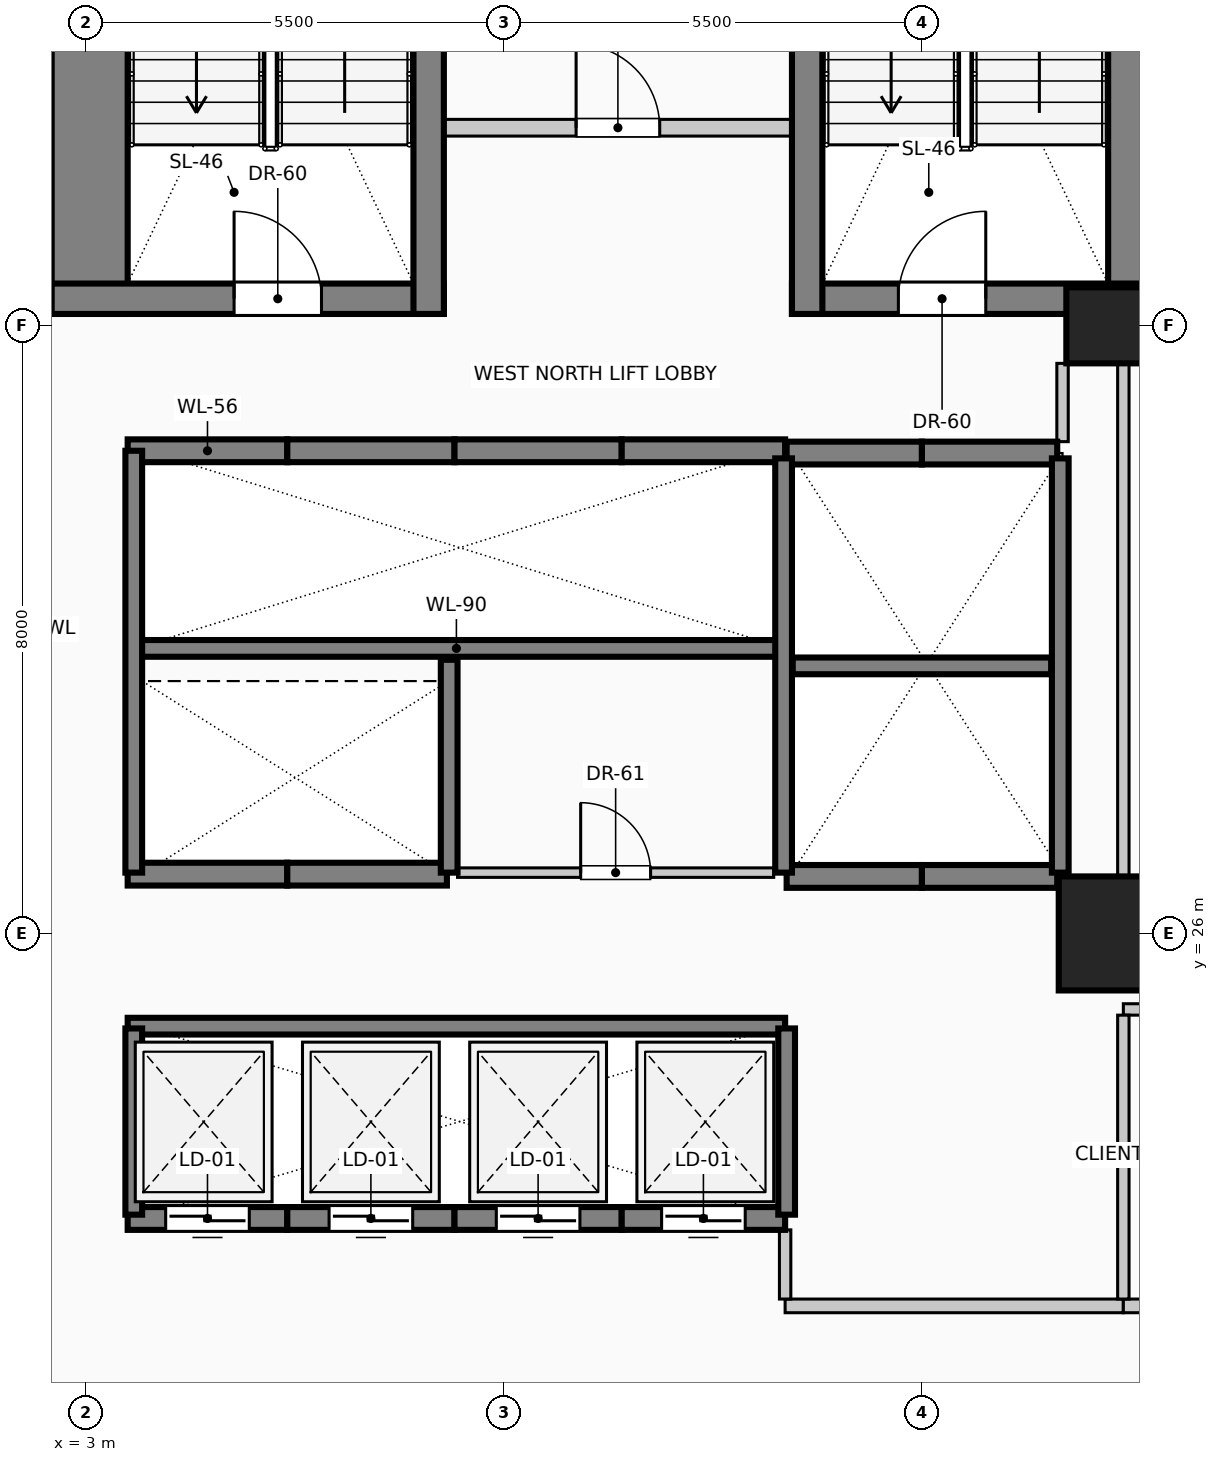
"""IFC4 building model, lengths in metres.
Left out: names, types, materials, properties, quantities, classifications, styles, units other than length and angle.
Written with IfcOpenShell. Run it as: python <this file> out.ifc"""

import sys

from ifc_helpers import new_model, si_unit, direction, frame, frame_2d, origin, origin_2d, place, context, subcontext, project, spatial, rectangle, circle, extrude, element, fill, save


model = new_model("IFC4")
c1 = context("Model", 3, precision=1e-05, world=origin(), true_north=direction((0.0, 1.0)))
c2 = subcontext(c1, "Body", "Model", "MODEL_VIEW")
j1 = project(units=[si_unit("LENGTHUNIT", "METRE"), si_unit("PLANEANGLEUNIT", "RADIAN")], contexts=[c1])
p1 = place(None, origin())
s1 = spatial("IfcSite", under=j1, at=p1, CompositionType="ELEMENT")
p2 = place(p1, origin())
s2 = spatial("IfcBuilding", under=s1, at=p2, CompositionType="ELEMENT")
p3 = place(p2, frame((0.0, 0.0, 58.6)))
s3 = spatial("IfcBuildingStorey", under=s2, at=p3, CompositionType="ELEMENT", Elevation=58.6)
for number, where, z_axis, x_axis in (
    (1, (3.05, 34.15, 0.0), (0.0, 0.0, 1.0), (0.0, 1.0, 0.0)),
    (2, (16.95, 34.15, 0.0), (0.0, 0.0, 1.0), (0.0, 1.0, 0.0)),
):
    element("IfcWall", number, at=place(p3, frame(where, z_axis=z_axis, x_axis=x_axis)), inside=s3, PredefinedType="SHEAR", context=c2, shape_type="SweptSolid", body=[
        extrude(rectangle(XDim=9.28, YDim=1.0, at=frame_2d((4.64, 0.0))), origin(), (0.0, 0.0, 1.0), 4.0),
    ])
p4 = place(p3, frame((2.55, 34.35, 0.0), z_axis=(0.0, 0.0, 1.0), x_axis=(1.0, 0.0, 0.0)))
e3 = element("IfcWall", 3, at=p4, inside=s3, PredefinedType="SHEAR", context=c2, shape_type="SweptSolid", body=[
    extrude(rectangle(XDim=5.16, YDim=0.4, at=frame_2d((2.58, 0.0))), origin(), (0.0, 0.0, 1.0), 4.0),
])
p5 = place(p4, frame((2.4, 0.0, 0.0)))
e4 = element("IfcOpeningElement", 4, at=p5, cuts=e3, PredefinedType="OPENING", context=c2, shape_type="SweptSolid", body=[
    extrude(rectangle(XDim=1.15, YDim=2.2, at=frame_2d((0.575, 1.1))), frame((0.0, 0.21, 0.0), z_axis=(0.0, -1.0, 0.0), x_axis=(1.0, 0.0, 0.0)), (0.0, 0.0, 1.0), 0.42),
])
p6 = place(p3, frame((12.29, 34.35, 0.0), z_axis=(0.0, 0.0, 1.0), x_axis=(1.0, 0.0, 0.0)))
e5 = element("IfcWall", 5, at=p6, inside=s3, PredefinedType="SHEAR", context=c2, shape_type="SweptSolid", body=[
    extrude(rectangle(XDim=5.16, YDim=0.4, at=frame_2d((2.58, 0.0))), origin(), (0.0, 0.0, 1.0), 4.0),
])
p7 = place(p6, frame((1.4, 0.0, 0.0)))
e6 = element("IfcOpeningElement", 6, at=p7, cuts=e5, PredefinedType="OPENING", context=c2, shape_type="SweptSolid", body=[
    extrude(rectangle(XDim=1.15, YDim=2.2, at=frame_2d((0.575, 1.1))), frame((0.0, 0.21, 0.0), z_axis=(0.0, -1.0, 0.0), x_axis=(1.0, 0.0, 0.0)), (0.0, 0.0, 1.0), 0.42),
])
for number, where, z_axis, x_axis in (
    (7, (7.51, 34.15, 0.0), (0.0, 0.0, 1.0), (0.0, 1.0, 0.0)),
    (8, (12.49, 34.15, 0.0), (0.0, 0.0, 1.0), (0.0, 1.0, 0.0)),
):
    element("IfcWall", number, at=place(p3, frame(where, z_axis=z_axis, x_axis=x_axis)), inside=s3, PredefinedType="SHEAR", context=c2, shape_type="SweptSolid", body=[
        extrude(rectangle(XDim=9.28, YDim=0.4, at=frame_2d((4.64, 0.0))), origin(), (0.0, 0.0, 1.0), 4.0),
    ])
p8 = place(p3, frame((16.4, 26.0, 0.0), z_axis=(0.0, 0.0, 1.0), x_axis=(1.0, 0.0, 0.0)))
e9 = element("IfcColumn", 9, at=p8, inside=s3, PredefinedType="COLUMN", context=c2, shape_type="SweptSolid", body=[
    extrude(rectangle(XDim=1.2, YDim=1.5, at=origin_2d()), origin(), (0.0, 0.0, 1.0), 4.0),
])
p9 = place(p3, frame((16.4, 34.0, 0.0), z_axis=(0.0, 0.0, 1.0), x_axis=(1.0, 0.0, 0.0)))
e10 = element("IfcColumn", 10, at=p9, inside=s3, PredefinedType="COLUMN", context=c2, shape_type="SweptSolid", body=[
    extrude(circle(Radius=0.5, at=origin_2d()), origin(), (0.0, 0.0, 1.0), 4.0),
])
p10 = place(p3, frame((5.65, 22.25, 0.0), z_axis=(0.0, 0.0, 1.0), x_axis=(-1.0, 0.0, 0.0)))
e11 = element("IfcWall", 11, at=p10, inside=s3, PredefinedType="SOLIDWALL", context=c2, shape_type="SweptSolid", body=[
    extrude(rectangle(XDim=2.1, YDim=0.3, at=frame_2d((1.05, 0.0))), origin(), (0.0, 0.0, 1.0), 4.0),
])
p11 = place(p10, frame((0.5, 0.0, 0.0)))
e12 = element("IfcOpeningElement", 12, at=p11, cuts=e11, PredefinedType="OPENING", context=c2, shape_type="SweptSolid", body=[
    extrude(rectangle(XDim=1.1, YDim=2.2, at=frame_2d((0.55, 1.1))), frame((0.0, 0.16, 0.0), z_axis=(0.0, -1.0, 0.0), x_axis=(1.0, 0.0, 0.0)), (0.0, 0.0, 1.0), 0.32),
])
p12 = place(p3, frame((7.85, 22.25, 0.0), z_axis=(0.0, 0.0, 1.0), x_axis=(-1.0, 0.0, 0.0)))
e13 = element("IfcWall", 13, at=p12, inside=s3, PredefinedType="SOLIDWALL", context=c2, shape_type="SweptSolid", body=[
    extrude(rectangle(XDim=2.2, YDim=0.3, at=frame_2d((1.1, 0.0))), origin(), (0.0, 0.0, 1.0), 4.0),
])
p13 = place(p12, frame((0.55, 0.0, 0.0)))
e14 = element("IfcOpeningElement", 14, at=p13, cuts=e13, PredefinedType="OPENING", context=c2, shape_type="SweptSolid", body=[
    extrude(rectangle(XDim=1.1, YDim=2.2, at=frame_2d((0.55, 1.1))), frame((0.0, 0.16, 0.0), z_axis=(0.0, -1.0, 0.0), x_axis=(1.0, 0.0, 0.0)), (0.0, 0.0, 1.0), 0.32),
])
p14 = place(p3, frame((10.05, 22.25, 0.0), z_axis=(0.0, 0.0, 1.0), x_axis=(-1.0, 0.0, 0.0)))
e15 = element("IfcWall", 15, at=p14, inside=s3, PredefinedType="SOLIDWALL", context=c2, shape_type="SweptSolid", body=[
    extrude(rectangle(XDim=2.2, YDim=0.3, at=frame_2d((1.1, 0.0))), origin(), (0.0, 0.0, 1.0), 4.0),
])
p15 = place(p14, frame((0.55, 0.0, 0.0)))
e16 = element("IfcOpeningElement", 16, at=p15, cuts=e15, PredefinedType="OPENING", context=c2, shape_type="SweptSolid", body=[
    extrude(rectangle(XDim=1.1, YDim=2.2, at=frame_2d((0.55, 1.1))), frame((0.0, 0.16, 0.0), z_axis=(0.0, -1.0, 0.0), x_axis=(1.0, 0.0, 0.0)), (0.0, 0.0, 1.0), 0.32),
])
p16 = place(p3, frame((12.2, 22.25, 0.0), z_axis=(0.0, 0.0, 1.0), x_axis=(-1.0, 0.0, 0.0)))
e17 = element("IfcWall", 17, at=p16, inside=s3, PredefinedType="SOLIDWALL", context=c2, shape_type="SweptSolid", body=[
    extrude(rectangle(XDim=2.15, YDim=0.3, at=frame_2d((1.075, 0.0))), origin(), (0.0, 0.0, 1.0), 4.0),
])
p17 = place(p16, frame((0.525, 0.0, 0.0)))
e18 = element("IfcOpeningElement", 18, at=p17, cuts=e17, PredefinedType="OPENING", context=c2, shape_type="SweptSolid", body=[
    extrude(rectangle(XDim=1.1, YDim=2.2, at=frame_2d((0.55, 1.1))), frame((0.0, 0.16, 0.0), z_axis=(0.0, -1.0, 0.0), x_axis=(1.0, 0.0, 0.0)), (0.0, 0.0, 1.0), 0.32),
])
for number, where, z_axis, x_axis in (
    (19, (14.0, 26.75, 0.0), (0.0, 0.0, 1.0), (-1.0, 0.0, 0.0)),
    (20, (15.78, 26.75, 0.0), (0.0, 0.0, 1.0), (-1.0, 0.0, 0.0)),
    (21, (12.22, 32.32, 0.0), (0.0, 0.0, 1.0), (1.0, 0.0, 0.0)),
    (22, (14.0, 32.32, 0.0), (0.0, 0.0, 1.0), (1.0, 0.0, 0.0)),
):
    element("IfcWall", number, at=place(p3, frame(where, z_axis=z_axis, x_axis=x_axis)), inside=s3, PredefinedType="SOLIDWALL", context=c2, shape_type="SweptSolid", body=[
        extrude(rectangle(XDim=1.78, YDim=0.3, at=frame_2d((0.89, 0.0))), origin(), (0.0, 0.0, 1.0), 4.0),
    ])
p18 = place(p3, frame((3.55, 32.35, 0.0), z_axis=(0.0, 0.0, 1.0), x_axis=(1.0, 0.0, 0.0)))
e23 = element("IfcWall", 23, at=p18, inside=s3, PredefinedType="SOLIDWALL", context=c2, shape_type="SweptSolid", body=[
    extrude(rectangle(XDim=2.1, YDim=0.3, at=frame_2d((1.05, 0.0))), origin(), (0.0, 0.0, 1.0), 4.0),
])
p19 = place(p3, frame((5.65, 32.35, 0.0), z_axis=(0.0, 0.0, 1.0), x_axis=(1.0, 0.0, 0.0)))
e24 = element("IfcWall", 24, at=p19, inside=s3, PredefinedType="SOLIDWALL", context=c2, shape_type="SweptSolid", body=[
    extrude(rectangle(XDim=2.2, YDim=0.3, at=frame_2d((1.1, 0.0))), origin(), (0.0, 0.0, 1.0), 4.0),
])
p20 = place(p3, frame((7.85, 32.35, 0.0), z_axis=(0.0, 0.0, 1.0), x_axis=(1.0, 0.0, 0.0)))
e25 = element("IfcWall", 25, at=p20, inside=s3, PredefinedType="SOLIDWALL", context=c2, shape_type="SweptSolid", body=[
    extrude(rectangle(XDim=2.2, YDim=0.3, at=frame_2d((1.1, 0.0))), origin(), (0.0, 0.0, 1.0), 4.0),
])
p21 = place(p3, frame((10.05, 32.35, 0.0), z_axis=(0.0, 0.0, 1.0), x_axis=(1.0, 0.0, 0.0)))
e26 = element("IfcWall", 26, at=p21, inside=s3, PredefinedType="SOLIDWALL", context=c2, shape_type="SweptSolid", body=[
    extrude(rectangle(XDim=2.15, YDim=0.3, at=frame_2d((1.075, 0.0))), origin(), (0.0, 0.0, 1.0), 4.0),
])
p22 = place(p3, frame((5.65, 26.78, 0.0), z_axis=(0.0, 0.0, 1.0), x_axis=(-1.0, 0.0, 0.0)))
e27 = element("IfcWall", 27, at=p22, inside=s3, PredefinedType="SOLIDWALL", context=c2, shape_type="SweptSolid", body=[
    extrude(rectangle(XDim=2.1, YDim=0.3, at=frame_2d((1.05, 0.0))), origin(), (0.0, 0.0, 1.0), 4.0),
])
p23 = place(p3, frame((7.75, 26.78, 0.0), z_axis=(0.0, 0.0, 1.0), x_axis=(-1.0, 0.0, 0.0)))
e28 = element("IfcWall", 28, at=p23, inside=s3, PredefinedType="SOLIDWALL", context=c2, shape_type="SweptSolid", body=[
    extrude(rectangle(XDim=2.1, YDim=0.3, at=frame_2d((1.05, 0.0))), origin(), (0.0, 0.0, 1.0), 4.0),
])
p24 = place(p3, frame((3.55, 29.75, 0.0), z_axis=(0.0, 0.0, 1.0), x_axis=(1.0, 0.0, 0.0)))
e29 = element("IfcWall", 29, at=p24, inside=s3, PredefinedType="SOLIDWALL", context=c2, shape_type="SweptSolid", body=[
    extrude(rectangle(XDim=8.65, YDim=0.22, at=frame_2d((4.325, 0.0))), origin(), (0.0, 0.0, 1.0), 4.0),
])
p25 = place(p3, frame((3.63, 26.8, 0.0), z_axis=(0.0, 0.0, 1.0), x_axis=(0.0, 1.0, 0.0)))
e30 = element("IfcWall", 30, at=p25, inside=s3, PredefinedType="SOLIDWALL", context=c2, shape_type="SweptSolid", body=[
    extrude(rectangle(XDim=5.55, YDim=0.22, at=frame_2d((2.775, 0.0))), origin(), (0.0, 0.0, 1.0), 4.0),
])
p26 = place(p3, frame((7.78, 26.8, 0.0), z_axis=(0.0, 0.0, 1.0), x_axis=(0.0, 1.0, 0.0)))
e31 = element("IfcWall", 31, at=p26, inside=s3, PredefinedType="SOLIDWALL", context=c2, shape_type="SweptSolid", body=[
    extrude(rectangle(XDim=2.8, YDim=0.22, at=frame_2d((1.4, 0.0))), origin(), (0.0, 0.0, 1.0), 4.0),
])
for number, where, z_axis, x_axis in (
    (32, (12.18, 26.8, 0.0), (0.0, 0.0, 1.0), (0.0, 1.0, 0.0)),
    (33, (15.82, 26.8, 0.0), (0.0, 0.0, 1.0), (0.0, 1.0, 0.0)),
):
    element("IfcWall", number, at=place(p3, frame(where, z_axis=z_axis, x_axis=x_axis)), inside=s3, PredefinedType="SOLIDWALL", context=c2, shape_type="SweptSolid", body=[
        extrude(rectangle(XDim=5.45, YDim=0.22, at=frame_2d((2.725, 0.0))), origin(), (0.0, 0.0, 1.0), 4.0),
    ])
p27 = place(p3, frame((12.3, 29.52, 0.0), z_axis=(0.0, 0.0, 1.0), x_axis=(1.0, 0.0, 0.0)))
e34 = element("IfcWall", 34, at=p27, inside=s3, PredefinedType="SOLIDWALL", context=c2, shape_type="SweptSolid", body=[
    extrude(rectangle(XDim=3.4, YDim=0.22, at=frame_2d((1.7, 0.0))), origin(), (0.0, 0.0, 1.0), 4.0),
])
p28 = place(p3, frame((3.55, 24.78, 0.0), z_axis=(0.0, 0.0, 1.0), x_axis=(1.0, 0.0, 0.0)))
e35 = element("IfcWall", 35, at=p28, inside=s3, PredefinedType="SOLIDWALL", context=c2, shape_type="SweptSolid", body=[
    extrude(rectangle(XDim=8.65, YDim=0.22, at=frame_2d((4.325, 0.0))), origin(), (0.0, 0.0, 1.0), 4.0),
])
for number, where, z_axis, x_axis in (
    (36, (3.63, 22.3, 0.0), (0.0, 0.0, 1.0), (0.0, 1.0, 0.0)),
    (37, (12.22, 22.3, 0.0), (0.0, 0.0, 1.0), (0.0, 1.0, 0.0)),
):
    element("IfcWall", number, at=place(p3, frame(where, z_axis=z_axis, x_axis=x_axis)), inside=s3, PredefinedType="SOLIDWALL", context=c2, shape_type="SweptSolid", body=[
        extrude(rectangle(XDim=2.45, YDim=0.22, at=frame_2d((1.225, 0.0))), origin(), (0.0, 0.0, 1.0), 4.0),
    ])
p29 = place(p3, frame((7.51, 36.6, 0.0), z_axis=(0.0, 0.0, 1.0), x_axis=(1.0, 0.0, 0.0)))
e38 = element("IfcWall", 38, at=p29, inside=s3, PredefinedType="PARTITIONING", context=c2, shape_type="SweptSolid", body=[
    extrude(rectangle(XDim=4.98, YDim=0.22, at=frame_2d((2.49, 0.0))), origin(), (0.0, 0.0, 1.0), 3.7),
])
p30 = place(p29, frame((1.94, 0.0, 0.0)))
e39 = element("IfcOpeningElement", 39, at=p30, cuts=e38, PredefinedType="OPENING", context=c2, shape_type="SweptSolid", body=[
    extrude(rectangle(XDim=1.1, YDim=2.2, at=frame_2d((0.55, 1.1))), frame((0.0, 0.12, 0.0), z_axis=(0.0, -1.0, 0.0), x_axis=(1.0, 0.0, 0.0)), (0.0, 0.0, 1.0), 0.24),
])
p31 = place(p3, frame((12.2, 21.1, 0.0), z_axis=(0.0, 0.0, 1.0), x_axis=(1.0, 0.0, 0.0)))
e40 = element("IfcWall", 40, at=p31, inside=s3, PredefinedType="PARTITIONING", context=c2, shape_type="SweptSolid", body=[
    extrude(rectangle(XDim=4.45, YDim=0.18, at=frame_2d((2.225, 0.0))), origin(), (0.0, 0.0, 1.0), 3.7),
])
p32 = place(p3, frame((16.65, 21.1, 0.0), z_axis=(0.0, 0.0, 1.0), x_axis=(1.0, 0.0, 0.0)))
e41 = element("IfcWall", 41, at=p32, inside=s3, PredefinedType="PARTITIONING", context=c2, shape_type="SweptSolid", body=[
    extrude(rectangle(XDim=8.75, YDim=0.18, at=frame_2d((4.375, 0.0))), origin(), (0.0, 0.0, 1.0), 3.7),
])
p33 = place(p32, frame((3.85, 0.0, 0.0)))
e42 = element("IfcOpeningElement", 42, at=p33, cuts=e41, PredefinedType="OPENING", context=c2, shape_type="SweptSolid", body=[
    extrude(rectangle(XDim=1.05, YDim=2.15, at=frame_2d((0.525, 1.075))), frame((0.0, 0.1, 0.0), z_axis=(0.0, -1.0, 0.0), x_axis=(1.0, 0.0, 0.0)), (0.0, 0.0, 1.0), 0.2),
])
p34 = place(p3, frame((16.65, 25.0, 0.0), z_axis=(0.0, 0.0, 1.0), x_axis=(1.0, 0.0, 0.0)))
e43 = element("IfcWall", 43, at=p34, inside=s3, PredefinedType="PARTITIONING", context=c2, shape_type="SweptSolid", body=[
    extrude(rectangle(XDim=8.75, YDim=0.15, at=frame_2d((4.375, 0.0))), origin(), (0.0, 0.0, 1.0), 3.7),
])
p35 = place(p3, frame((7.89, 26.8, 0.0), z_axis=(0.0, 0.0, 1.0), x_axis=(1.0, 0.0, 0.0)))
e44 = element("IfcWall", 44, at=p35, inside=s3, PredefinedType="PARTITIONING", context=c2, shape_type="SweptSolid", body=[
    extrude(rectangle(XDim=4.16, YDim=0.125, at=frame_2d((2.08, 0.0))), origin(), (0.0, 0.0, 1.0), 3.7),
])
p36 = place(p35, frame((1.62, 0.0, 0.0)))
e45 = element("IfcOpeningElement", 45, at=p36, cuts=e44, PredefinedType="OPENING", context=c2, shape_type="SweptSolid", body=[
    extrude(rectangle(XDim=0.92, YDim=2.1, at=frame_2d((0.46, 1.05))), frame((0.0, 0.073, 0.0), z_axis=(0.0, -1.0, 0.0), x_axis=(1.0, 0.0, 0.0)), (0.0, 0.0, 1.0), 0.145),
])
p37 = place(p3, frame((12.2, 21.19, 0.0), z_axis=(0.0, 0.0, 1.0), x_axis=(0.0, 1.0, 0.0)))
e46 = element("IfcWall", 46, at=p37, inside=s3, PredefinedType="PARTITIONING", context=c2, shape_type="SweptSolid", body=[
    extrude(rectangle(XDim=0.91, YDim=0.15, at=frame_2d((0.455, 0.0))), origin(), (0.0, 0.0, 1.0), 3.7),
])
p38 = place(p3, frame((15.85, 32.47, 0.0), z_axis=(0.0, 0.0, 1.0), x_axis=(0.0, 1.0, 0.0)))
e47 = element("IfcWall", 47, at=p38, inside=s3, PredefinedType="PARTITIONING", context=c2, shape_type="SweptSolid", body=[
    extrude(rectangle(XDim=1.03, YDim=0.15, at=frame_2d((0.515, 0.0))), origin(), (0.0, 0.0, 1.0), 3.7),
])
p39 = place(p3, frame((16.65, 21.19, 0.0), z_axis=(0.0, 0.0, 1.0), x_axis=(0.0, 1.0, 0.0)))
e48 = element("IfcWall", 48, at=p39, inside=s3, PredefinedType="PARTITIONING", context=c2, shape_type="SweptSolid", body=[
    extrude(rectangle(XDim=3.735, YDim=0.15, at=frame_2d((1.868, 0.0))), origin(), (0.0, 0.0, 1.0), 2.995),
])
p40 = place(p3, frame((16.65, 26.75, 0.0), z_axis=(0.0, 0.0, 1.0), x_axis=(0.0, 1.0, 0.0)))
e49 = element("IfcWall", 49, at=p40, inside=s3, PredefinedType="PARTITIONING", context=c2, shape_type="SweptSolid", body=[
    extrude(rectangle(XDim=6.75, YDim=0.15, at=frame_2d((3.375, 0.0))), origin(), (0.0, 0.0, 1.0), 2.995),
])
p41 = place(p11, origin())
e50 = element("IfcDoor", 50, at=p41, inside=s3, OperationType="SLIDING_TO_LEFT", PredefinedType="DOOR", context=c2, shape_type="SweptSolid", body=[
    extrude(rectangle(XDim=1.1, YDim=2.2, at=frame_2d((0.55, 1.1))), frame((0.0, 0.025, 0.0), z_axis=(0.0, -1.0, 0.0), x_axis=(1.0, 0.0, 0.0)), (0.0, 0.0, 1.0), 0.05),
])
fill(e12, e50)
p42 = place(p13, origin())
e51 = element("IfcDoor", 51, at=p42, inside=s3, OperationType="SLIDING_TO_RIGHT", PredefinedType="DOOR", context=c2, shape_type="SweptSolid", body=[
    extrude(rectangle(XDim=1.1, YDim=2.2, at=frame_2d((0.55, 1.1))), frame((0.0, 0.025, 0.0), z_axis=(0.0, -1.0, 0.0), x_axis=(1.0, 0.0, 0.0)), (0.0, 0.0, 1.0), 0.05),
])
fill(e14, e51)
p43 = place(p15, origin())
e52 = element("IfcDoor", 52, at=p43, inside=s3, OperationType="SLIDING_TO_LEFT", PredefinedType="DOOR", context=c2, shape_type="SweptSolid", body=[
    extrude(rectangle(XDim=1.1, YDim=2.2, at=frame_2d((0.55, 1.1))), frame((0.0, 0.025, 0.0), z_axis=(0.0, -1.0, 0.0), x_axis=(1.0, 0.0, 0.0)), (0.0, 0.0, 1.0), 0.05),
])
fill(e16, e52)
p44 = place(p17, origin())
e53 = element("IfcDoor", 53, at=p44, inside=s3, OperationType="SLIDING_TO_RIGHT", PredefinedType="DOOR", context=c2, shape_type="SweptSolid", body=[
    extrude(rectangle(XDim=1.1, YDim=2.2, at=frame_2d((0.55, 1.1))), frame((0.0, 0.025, 0.0), z_axis=(0.0, -1.0, 0.0), x_axis=(1.0, 0.0, 0.0)), (0.0, 0.0, 1.0), 0.05),
])
fill(e18, e53)
p45 = place(p5, origin())
e54 = element("IfcDoor", 54, at=p45, inside=s3, OperationType="SINGLE_SWING_LEFT", PredefinedType="DOOR", context=c2, shape_type="SweptSolid", body=[
    extrude(rectangle(XDim=1.15, YDim=2.2, at=frame_2d((0.575, 1.1))), frame((0.0, 0.025, 0.0), z_axis=(0.0, -1.0, 0.0), x_axis=(1.0, 0.0, 0.0)), (0.0, 0.0, 1.0), 0.05),
])
fill(e4, e54)
p46 = place(p7, origin())
e55 = element("IfcDoor", 55, at=p46, inside=s3, OperationType="SINGLE_SWING_RIGHT", PredefinedType="DOOR", context=c2, shape_type="SweptSolid", body=[
    extrude(rectangle(XDim=1.15, YDim=2.2, at=frame_2d((0.575, 1.1))), frame((0.0, 0.025, 0.0), z_axis=(0.0, -1.0, 0.0), x_axis=(1.0, 0.0, 0.0)), (0.0, 0.0, 1.0), 0.05),
])
fill(e6, e55)
p47 = place(p30, origin())
e56 = element("IfcDoor", 56, at=p47, inside=s3, OperationType="SINGLE_SWING_LEFT", PredefinedType="DOOR", context=c2, shape_type="SweptSolid", body=[
    extrude(rectangle(XDim=1.1, YDim=2.2, at=frame_2d((0.55, 1.1))), frame((0.0, 0.025, 0.0), z_axis=(0.0, -1.0, 0.0), x_axis=(1.0, 0.0, 0.0)), (0.0, 0.0, 1.0), 0.05),
])
fill(e39, e56)
p48 = place(p36, origin())
e57 = element("IfcDoor", 57, at=p48, inside=s3, OperationType="SINGLE_SWING_LEFT", PredefinedType="DOOR", context=c2, shape_type="SweptSolid", body=[
    extrude(rectangle(XDim=0.92, YDim=2.1, at=frame_2d((0.46, 1.05))), frame((0.0, 0.025, 0.0), z_axis=(0.0, -1.0, 0.0), x_axis=(1.0, 0.0, 0.0)), (0.0, 0.0, 1.0), 0.05),
])
fill(e45, e57)
save(model, sys.argv[1])
